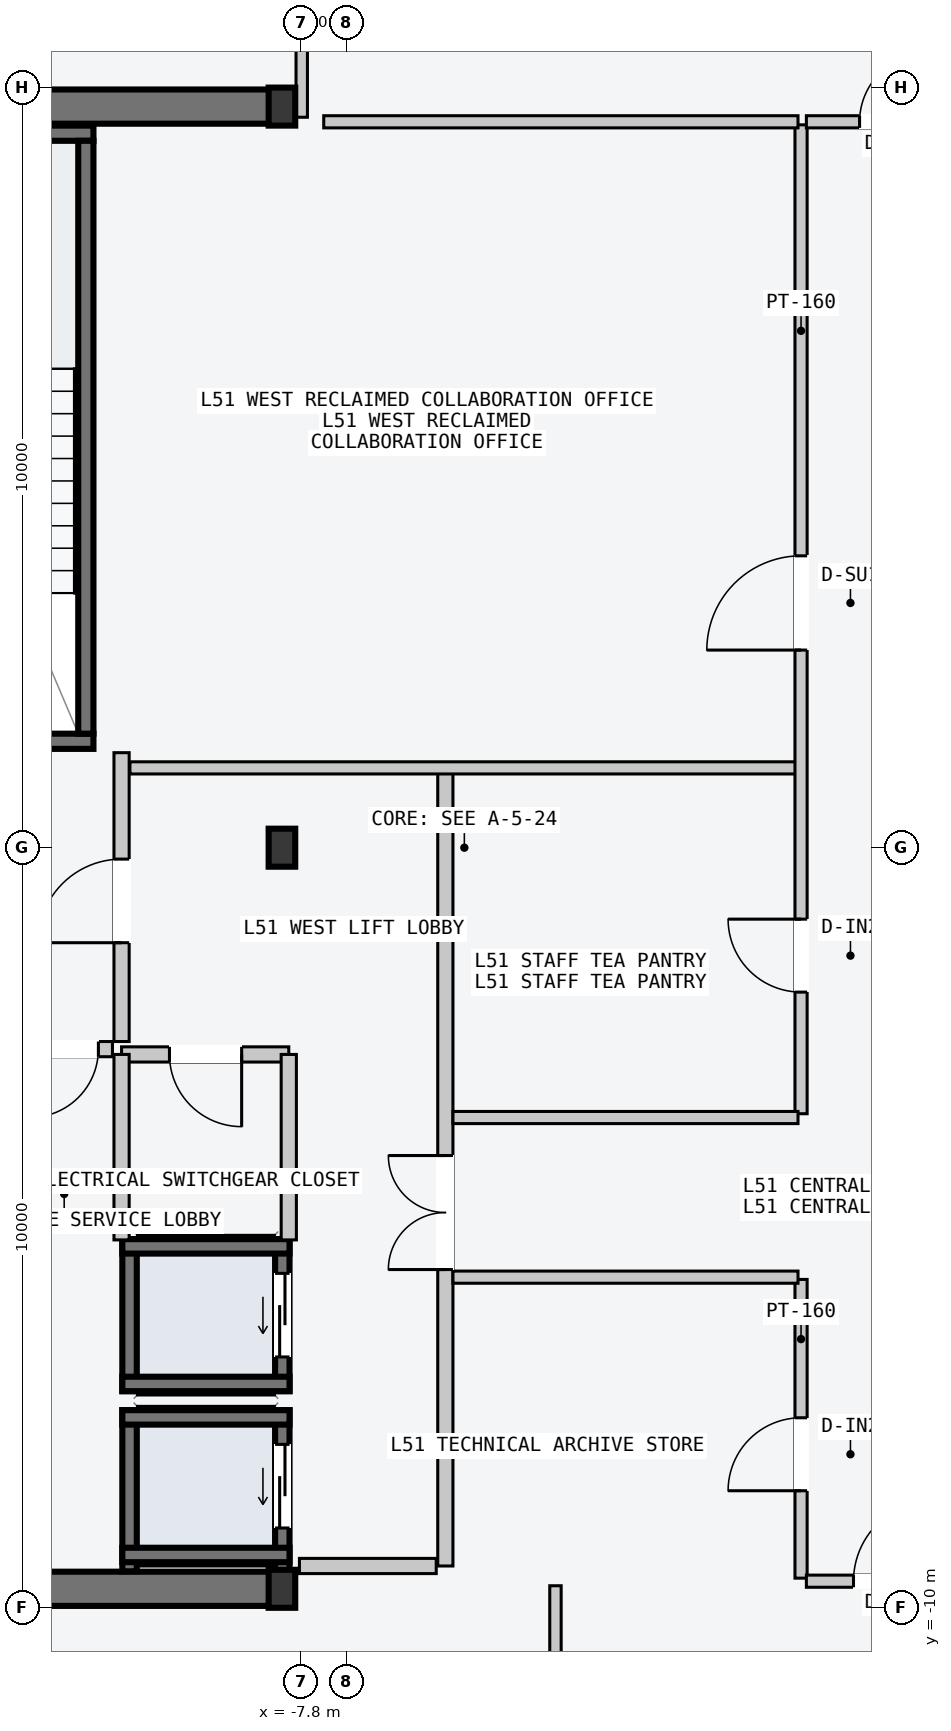
"""IFC4 building model, lengths in metres.
Left out: names, types, materials, properties, quantities, classifications, styles, units other than length and angle.
Written with IfcOpenShell. Run it as: python <this file> out.ifc"""

import sys

from ifc_helpers import new_model, si_unit, direction, frame, frame_2d, origin, origin_2d, place, context, subcontext, project, spatial, rectangle, i_section, extrude, element, fill, save


model = new_model("IFC4")
c1 = context("Model", 3, precision=1e-05, world=origin(), true_north=direction((0.0, 1.0)))
c2 = subcontext(c1, "Body", "Model", "MODEL_VIEW")
j1 = project(units=[si_unit("LENGTHUNIT", "METRE"), si_unit("PLANEANGLEUNIT", "RADIAN")], contexts=[c1])
p1 = place(None, origin())
s1 = spatial("IfcSite", under=j1, at=p1, CompositionType="ELEMENT")
p2 = place(p1, origin())
s2 = spatial("IfcBuilding", under=s1, at=p2, CompositionType="ELEMENT")
p3 = place(p2, frame((0.0, 0.0, 194.7)))
s3 = spatial("IfcBuildingStorey", under=s2, at=p3, CompositionType="ELEMENT", Elevation=194.7)
for number, where, z_axis, x_axis in (
    (1, (-14.53, -9.75, -0.2), (0.0, 0.0, 1.0), (1.0, 0.0, 0.0)),
    (2, (-14.53, 9.75, -0.2), (0.0, 0.0, 1.0), (1.0, 0.0, 0.0)),
):
    element("IfcWall", number, at=place(p3, frame(where, z_axis=z_axis, x_axis=x_axis)), inside=s3, PredefinedType="SHEAR", context=c2, shape_type="SweptSolid", body=[
        extrude(rectangle(XDim=6.46, YDim=0.45, at=frame_2d((3.23, 0.0))), origin(), (0.0, 0.0, 1.0), 3.6),
    ])
p4 = place(p3, frame((-14.25, 1.4, -0.2), z_axis=(0.0, 0.0, 1.0), x_axis=(1.0, 0.0, 0.0)))
e3 = element("IfcWall", 3, at=p4, inside=s3, PredefinedType="SOLIDWALL", context=c2, shape_type="SweptSolid", body=[
    extrude(rectangle(XDim=3.72, YDim=0.2, at=frame_2d((1.86, 0.0))), origin(), (0.0, 0.0, 1.0), 3.6),
])
p5 = place(p4, frame((1.5, 0.0, 0.2)))
e4 = element("IfcOpeningElement", 4, at=p5, cuts=e3, PredefinedType="OPENING", context=c2, shape_type="SweptSolid", body=[
    extrude(rectangle(XDim=1.12, YDim=2.18, at=frame_2d((0.56, 1.09))), frame((0.0, 0.11, 0.0), z_axis=(0.0, -1.0, 0.0), x_axis=(1.0, 0.0, 0.0)), (0.0, 0.0, 1.0), 0.22),
])
p6 = place(p3, frame((-14.25, 9.4, -0.2), z_axis=(0.0, 0.0, 1.0), x_axis=(1.0, 0.0, 0.0)))
e5 = element("IfcWall", 5, at=p6, inside=s3, PredefinedType="SOLIDWALL", context=c2, shape_type="SweptSolid", body=[
    extrude(rectangle(XDim=3.72, YDim=0.2, at=frame_2d((1.86, 0.0))), origin(), (0.0, 0.0, 1.0), 3.6),
])
p7 = place(p3, frame((-10.63, 1.5, -0.2), z_axis=(0.0, 0.0, 1.0), x_axis=(0.0, 1.0, 0.0)))
e6 = element("IfcWall", 6, at=p7, inside=s3, PredefinedType="SOLIDWALL", context=c2, shape_type="SweptSolid", body=[
    extrude(rectangle(XDim=7.8, YDim=0.2, at=frame_2d((3.9, 0.0))), origin(), (0.0, 0.0, 1.0), 3.6),
])
for number, where, z_axis, x_axis in (
    (7, (-8.05, -9.75, 0.0), (0.0, 0.0, 1.0), (1.0, 0.0, 0.0)),
    (8, (-8.05, 0.0, 0.0), (0.0, 0.0, 1.0), (1.0, 0.0, 0.0)),
    (9, (-8.05, 9.75, 0.0), (0.0, 0.0, 1.0), (1.0, 0.0, 0.0)),
):
    element("IfcColumn", number, at=place(p3, frame(where, z_axis=z_axis, x_axis=x_axis)), inside=s3, PredefinedType="COLUMN", context=c2, shape_type="SweptSolid", body=[
        extrude(i_section(OverallWidth=0.35, OverallDepth=0.5, WebThickness=0.02, FlangeThickness=0.032, at=origin_2d()), origin(), (0.0, 0.0, 1.0), 3.6),
    ])
p8 = place(p3, frame((-8.045, -9.52, -0.2), z_axis=(0.0, 0.0, 1.0), x_axis=(0.0, 1.0, 0.0)))
e10 = element("IfcWall", 10, at=p8, inside=s3, PredefinedType="SOLIDWALL", context=c2, shape_type="SweptSolid", body=[
    extrude(rectangle(XDim=2.12, YDim=0.19, at=frame_2d((1.06, 0.0))), origin(), (0.0, 0.0, 1.0), 3.6),
])
p9 = place(p8, frame((0.57, 0.0, 0.2)))
e11 = element("IfcOpeningElement", 11, at=p9, cuts=e10, PredefinedType="OPENING", context=c2, shape_type="SweptSolid", body=[
    extrude(rectangle(XDim=1.1, YDim=2.2, at=frame_2d((0.55, 1.1))), frame((0.0, 0.105, 0.0), z_axis=(0.0, -1.0, 0.0), x_axis=(1.0, 0.0, 0.0)), (0.0, 0.0, 1.0), 0.21),
])
p10 = place(p3, frame((-10.055, -9.52, -0.2), z_axis=(0.0, 0.0, 1.0), x_axis=(0.0, 1.0, 0.0)))
e12 = element("IfcWall", 12, at=p10, inside=s3, PredefinedType="SOLIDWALL", context=c2, shape_type="SweptSolid", body=[
    extrude(rectangle(XDim=2.12, YDim=0.19, at=frame_2d((1.06, 0.0))), origin(), (0.0, 0.0, 1.0), 3.6),
])
for number, where, z_axis, x_axis in (
    (13, (-10.15, -7.495, -0.2), (0.0, 0.0, 1.0), (1.0, 0.0, 0.0)),
    (14, (-10.15, -9.305, -0.2), (0.0, 0.0, 1.0), (1.0, 0.0, 0.0)),
):
    element("IfcWall", number, at=place(p3, frame(where, z_axis=z_axis, x_axis=x_axis)), inside=s3, PredefinedType="SOLIDWALL", context=c2, shape_type="SweptSolid", body=[
        extrude(rectangle(XDim=2.2, YDim=0.19, at=frame_2d((1.1, 0.0))), origin(), (0.0, 0.0, 1.0), 3.6),
    ])
p11 = place(p3, frame((-8.045, -7.15, -0.2), z_axis=(0.0, 0.0, 1.0), x_axis=(0.0, 1.0, 0.0)))
e15 = element("IfcWall", 15, at=p11, inside=s3, PredefinedType="SOLIDWALL", context=c2, shape_type="SweptSolid", body=[
    extrude(rectangle(XDim=2.0, YDim=0.19, at=frame_2d((1.0, 0.0))), origin(), (0.0, 0.0, 1.0), 3.6),
])
p12 = place(p11, frame((0.45, 0.0, 0.2)))
e16 = element("IfcOpeningElement", 16, at=p12, cuts=e15, PredefinedType="OPENING", context=c2, shape_type="SweptSolid", body=[
    extrude(rectangle(XDim=1.1, YDim=2.2, at=frame_2d((0.55, 1.1))), frame((0.0, 0.105, 0.0), z_axis=(0.0, -1.0, 0.0), x_axis=(1.0, 0.0, 0.0)), (0.0, 0.0, 1.0), 0.21),
])
p13 = place(p3, frame((-10.055, -7.15, -0.2), z_axis=(0.0, 0.0, 1.0), x_axis=(0.0, 1.0, 0.0)))
e17 = element("IfcWall", 17, at=p13, inside=s3, PredefinedType="SOLIDWALL", context=c2, shape_type="SweptSolid", body=[
    extrude(rectangle(XDim=2.0, YDim=0.19, at=frame_2d((1.0, 0.0))), origin(), (0.0, 0.0, 1.0), 3.6),
])
for number, where, z_axis, x_axis in (
    (18, (-10.15, -5.245, -0.2), (0.0, 0.0, 1.0), (1.0, 0.0, 0.0)),
    (19, (-10.15, -7.055, -0.2), (0.0, 0.0, 1.0), (1.0, 0.0, 0.0)),
):
    element("IfcWall", number, at=place(p3, frame(where, z_axis=z_axis, x_axis=x_axis)), inside=s3, PredefinedType="SOLIDWALL", context=c2, shape_type="SweptSolid", body=[
        extrude(rectangle(XDim=2.2, YDim=0.19, at=frame_2d((1.1, 0.0))), origin(), (0.0, 0.0, 1.0), 3.6),
    ])
p14 = place(p3, frame((-5.9, -9.45, 0.0), z_axis=(0.0, 0.0, 1.0), x_axis=(0.0, 1.0, 0.0)))
e20 = element("IfcWall", 20, at=p14, inside=s3, PredefinedType="PARTITIONING", context=c2, shape_type="SweptSolid", body=[
    extrude(rectangle(XDim=10.5, YDim=0.2, at=frame_2d((5.25, 0.0))), origin(), (0.0, 0.0, 1.0), 3.4),
])
p15 = place(p14, frame((3.9, 0.0, 0.0)))
e21 = element("IfcOpeningElement", 21, at=p15, cuts=e20, PredefinedType="OPENING", context=c2, shape_type="SweptSolid", body=[
    extrude(rectangle(XDim=1.5, YDim=2.2, at=frame_2d((0.75, 1.1))), frame((0.0, 0.11, 0.0), z_axis=(0.0, -1.0, 0.0), x_axis=(1.0, 0.0, 0.0)), (0.0, 0.0, 1.0), 0.22),
])
p16 = place(p3, frame((-6.02, -9.45, 0.0), z_axis=(0.0, 0.0, 1.0), x_axis=(-1.0, 0.0, 0.0)))
e22 = element("IfcWall", 22, at=p16, inside=s3, PredefinedType="PARTITIONING", context=c2, shape_type="SweptSolid", body=[
    extrude(rectangle(XDim=1.8, YDim=0.2, at=frame_2d((0.9, 0.0))), origin(), (0.0, 0.0, 1.0), 3.4),
])
p17 = place(p3, frame((-10.16, -2.55, 0.0), z_axis=(0.0, 0.0, 1.0), x_axis=(0.0, 1.0, 0.0)))
e23 = element("IfcWall", 23, at=p17, inside=s3, PredefinedType="PARTITIONING", context=c2, shape_type="SweptSolid", body=[
    extrude(rectangle(XDim=3.8, YDim=0.2, at=frame_2d((1.9, 0.0))), origin(), (0.0, 0.0, 1.0), 3.4),
])
p18 = place(p17, frame((1.3, 0.0, 0.0)))
e24 = element("IfcOpeningElement", 24, at=p18, cuts=e23, PredefinedType="OPENING", context=c2, shape_type="SweptSolid", body=[
    extrude(rectangle(XDim=1.1, YDim=2.15, at=frame_2d((0.55, 1.075))), frame((0.0, 0.11, 0.0), z_axis=(0.0, -1.0, 0.0), x_axis=(1.0, 0.0, 0.0)), (0.0, 0.0, 1.0), 0.22),
])
p19 = place(p3, frame((-10.28, -2.65, 0.0), z_axis=(0.0, 0.0, 1.0), x_axis=(-1.0, 0.0, 0.0)))
e25 = element("IfcWall", 25, at=p19, inside=s3, PredefinedType="PARTITIONING", context=c2, shape_type="SweptSolid", body=[
    extrude(rectangle(XDim=1.27, YDim=0.2, at=frame_2d((0.635, 0.0))), origin(), (0.0, 0.0, 1.0), 3.4),
])
p20 = place(p19, frame((0.185, 0.0, 0.0)))
e26 = element("IfcOpeningElement", 26, at=p20, cuts=e25, PredefinedType="OPENING", context=c2, shape_type="SweptSolid", body=[
    extrude(rectangle(XDim=0.9, YDim=2.15, at=frame_2d((0.45, 1.075))), frame((0.0, 0.11, 0.0), z_axis=(0.0, -1.0, 0.0), x_axis=(1.0, 0.0, 0.0)), (0.0, 0.0, 1.0), 0.22),
])
p21 = place(p3, frame((-7.96, -2.72, 0.0), z_axis=(0.0, 0.0, 1.0), x_axis=(-1.0, 0.0, 0.0)))
e27 = element("IfcWall", 27, at=p21, inside=s3, PredefinedType="PARTITIONING", context=c2, shape_type="SweptSolid", body=[
    extrude(rectangle(XDim=2.2, YDim=0.2, at=frame_2d((1.1, 0.0))), origin(), (0.0, 0.0, 1.0), 3.4),
])
p22 = place(p21, frame((0.62, 0.0, 0.0)))
e28 = element("IfcOpeningElement", 28, at=p22, cuts=e27, PredefinedType="OPENING", context=c2, shape_type="SweptSolid", body=[
    extrude(rectangle(XDim=0.95, YDim=2.1, at=frame_2d((0.475, 1.05))), frame((0.0, 0.11, 0.0), z_axis=(0.0, -1.0, 0.0), x_axis=(1.0, 0.0, 0.0)), (0.0, 0.0, 1.0), 0.22),
])
for number, where, z_axis, x_axis in (
    (29, (-7.96, -5.16, 0.0), (0.0, 0.0, 1.0), (0.0, 1.0, 0.0)),
    (30, (-10.16, -5.16, 0.0), (0.0, 0.0, 1.0), (0.0, 1.0, 0.0)),
):
    element("IfcWall", number, at=place(p3, frame(where, z_axis=z_axis, x_axis=x_axis)), inside=s3, PredefinedType="PARTITIONING", context=c2, shape_type="SweptSolid", body=[
        extrude(rectangle(XDim=2.44, YDim=0.2, at=frame_2d((1.22, 0.0))), origin(), (0.0, 0.0, 1.0), 3.4),
    ])
p23 = place(p3, frame((-10.05, 1.05, 0.0), z_axis=(0.0, 0.0, 1.0), x_axis=(1.0, 0.0, 0.0)))
e31 = element("IfcWall", 31, at=p23, inside=s3, PredefinedType="PARTITIONING", context=c2, shape_type="SweptSolid", body=[
    extrude(rectangle(XDim=8.79, YDim=0.16, at=frame_2d((4.395, 0.0))), origin(), (0.0, 0.0, 1.0), 3.4),
])
p24 = place(p3, frame((-1.22, -3.5, 0.0), z_axis=(0.0, 0.0, 1.0), x_axis=(0.0, 1.0, 0.0)))
e32 = element("IfcWall", 32, at=p24, inside=s3, PredefinedType="PARTITIONING", context=c2, shape_type="SweptSolid", body=[
    extrude(rectangle(XDim=13.01, YDim=0.16, at=frame_2d((6.505, 0.0))), origin(), (0.0, 0.0, 1.0), 3.4),
])
p25 = place(p24, frame((6.1, 0.0, 0.0)))
e33 = element("IfcOpeningElement", 33, at=p25, cuts=e32, PredefinedType="OPENING", context=c2, shape_type="SweptSolid", body=[
    extrude(rectangle(XDim=1.24, YDim=2.24, at=frame_2d((0.62, 1.12))), frame((0.0, 0.09, 0.0), z_axis=(0.0, -1.0, 0.0), x_axis=(1.0, 0.0, 0.0)), (0.0, 0.0, 1.0), 0.18),
])
p26 = place(p24, frame((1.6, 0.0, 0.0)))
e34 = element("IfcOpeningElement", 34, at=p26, cuts=e32, PredefinedType="OPENING", context=c2, shape_type="SweptSolid", body=[
    extrude(rectangle(XDim=0.96, YDim=2.18, at=frame_2d((0.48, 1.09))), frame((0.0, 0.09, 0.0), z_axis=(0.0, -1.0, 0.0), x_axis=(1.0, 0.0, 0.0)), (0.0, 0.0, 1.0), 0.18),
])
p27 = place(p3, frame((-7.5, 9.55, 0.0), z_axis=(0.0, 0.0, 1.0), x_axis=(1.0, 0.0, 0.0)))
e35 = element("IfcWall", 35, at=p27, inside=s3, PredefinedType="PARTITIONING", context=c2, shape_type="SweptSolid", body=[
    extrude(rectangle(XDim=6.24, YDim=0.16, at=frame_2d((3.12, 0.0))), origin(), (0.0, 0.0, 1.0), 3.4),
])
p28 = place(p3, frame((-5.8, -3.55, 0.0), z_axis=(0.0, 0.0, 1.0), x_axis=(1.0, 0.0, 0.0)))
e36 = element("IfcWall", 36, at=p28, inside=s3, PredefinedType="PARTITIONING", context=c2, shape_type="SweptSolid", body=[
    extrude(rectangle(XDim=4.54, YDim=0.16, at=frame_2d((2.27, 0.0))), origin(), (0.0, 0.0, 1.0), 3.4),
])
p29 = place(p3, frame((-1.22, -9.61, 0.0), z_axis=(0.0, 0.0, 1.0), x_axis=(0.0, 1.0, 0.0)))
e37 = element("IfcWall", 37, at=p29, inside=s3, PredefinedType="PARTITIONING", context=c2, shape_type="SweptSolid", body=[
    extrude(rectangle(XDim=3.93, YDim=0.16, at=frame_2d((1.965, 0.0))), origin(), (0.0, 0.0, 1.0), 3.4),
])
p30 = place(p29, frame((1.15, 0.0, 0.0)))
e38 = element("IfcOpeningElement", 38, at=p30, cuts=e37, PredefinedType="OPENING", context=c2, shape_type="SweptSolid", body=[
    extrude(rectangle(XDim=0.96, YDim=2.18, at=frame_2d((0.48, 1.09))), frame((0.0, 0.09, 0.0), z_axis=(0.0, -1.0, 0.0), x_axis=(1.0, 0.0, 0.0)), (0.0, 0.0, 1.0), 0.18),
])
p31 = place(p3, frame((-5.8, -5.65, 0.0), z_axis=(0.0, 0.0, 1.0), x_axis=(1.0, 0.0, 0.0)))
e39 = element("IfcWall", 39, at=p31, inside=s3, PredefinedType="PARTITIONING", context=c2, shape_type="SweptSolid", body=[
    extrude(rectangle(XDim=4.54, YDim=0.16, at=frame_2d((2.27, 0.0))), origin(), (0.0, 0.0, 1.0), 3.4),
])
p32 = place(p3, frame((-7.79, 9.61, 0.0), z_axis=(0.0, 0.0, 1.0), x_axis=(0.0, 1.0, 0.0)))
e40 = element("IfcWall", 40, at=p32, inside=s3, PredefinedType="PARTITIONING", context=c2, shape_type="SweptSolid", body=[
    extrude(rectangle(XDim=8.95, YDim=0.15, at=frame_2d((4.475, 0.0))), origin(), (0.0, 0.0, 1.0), 3.4),
])
p33 = place(p32, frame((1.34, 0.0, 0.0)))
e41 = element("IfcOpeningElement", 41, at=p33, cuts=e40, PredefinedType="OPENING", context=c2, shape_type="SweptSolid", body=[
    extrude(rectangle(XDim=0.96, YDim=2.18, at=frame_2d((0.48, 1.09))), frame((0.0, 0.085, 0.0), z_axis=(0.0, -1.0, 0.0), x_axis=(1.0, 0.0, 0.0)), (0.0, 0.0, 1.0), 0.17),
])
p34 = place(p3, frame((-1.15, 9.55, 0.0), z_axis=(0.0, 0.0, 1.0), x_axis=(1.0, 0.0, 0.0)))
e42 = element("IfcWall", 42, at=p34, inside=s3, PredefinedType="PARTITIONING", context=c2, shape_type="SweptSolid", body=[
    extrude(rectangle(XDim=2.3, YDim=0.16, at=frame_2d((1.15, 0.0))), origin(), (0.0, 0.0, 1.0), 3.4),
])
p35 = place(p34, frame((0.7, 0.0, 0.0)))
e43 = element("IfcOpeningElement", 43, at=p35, cuts=e42, PredefinedType="OPENING", context=c2, shape_type="SweptSolid", body=[
    extrude(rectangle(XDim=0.9, YDim=2.15, at=frame_2d((0.45, 1.075))), frame((0.0, 0.09, 0.0), z_axis=(0.0, -1.0, 0.0), x_axis=(1.0, 0.0, 0.0)), (0.0, 0.0, 1.0), 0.18),
])
p36 = place(p3, frame((-4.451, -18.56, 0.0), z_axis=(0.0, 0.0, 1.0), x_axis=(0.0, 1.0, 0.0)))
e44 = element("IfcWall", 44, at=p36, inside=s3, PredefinedType="PARTITIONING", context=c2, shape_type="SweptSolid", body=[
    extrude(rectangle(XDim=8.85, YDim=0.15, at=frame_2d((4.425, 0.0))), origin(), (0.0, 0.0, 1.0), 3.4),
])
p37 = place(p36, frame((1.05, 0.0, 0.0)))
e45 = element("IfcOpeningElement", 45, at=p37, cuts=e44, PredefinedType="OPENING", context=c2, shape_type="SweptSolid", body=[
    extrude(rectangle(XDim=0.96, YDim=2.18, at=frame_2d((0.48, 1.09))), frame((0.0, 0.085, 0.0), z_axis=(0.0, -1.0, 0.0), x_axis=(1.0, 0.0, 0.0)), (0.0, 0.0, 1.0), 0.17),
])
p38 = place(p3, frame((-1.15, -9.65, 0.0), z_axis=(0.0, 0.0, 1.0), x_axis=(1.0, 0.0, 0.0)))
e46 = element("IfcWall", 46, at=p38, inside=s3, PredefinedType="PARTITIONING", context=c2, shape_type="SweptSolid", body=[
    extrude(rectangle(XDim=2.3, YDim=0.16, at=frame_2d((1.15, 0.0))), origin(), (0.0, 0.0, 1.0), 2.75),
])
p39 = place(p38, frame((0.62, 0.0, 0.0)))
e47 = element("IfcOpeningElement", 47, at=p39, cuts=e46, PredefinedType="OPENING", context=c2, shape_type="SweptSolid", body=[
    extrude(rectangle(XDim=1.06, YDim=2.2, at=frame_2d((0.53, 1.1))), frame((0.0, 0.09, 0.0), z_axis=(0.0, -1.0, 0.0), x_axis=(1.0, 0.0, 0.0)), (0.0, 0.0, 1.0), 0.18),
])
p40 = place(p9, origin())
e48 = element("IfcDoor", 48, at=p40, inside=s3, OperationType="SLIDING_TO_LEFT", PredefinedType="DOOR", context=c2, shape_type="SweptSolid", body=[
    extrude(rectangle(XDim=1.1, YDim=2.2, at=frame_2d((0.55, 1.1))), frame((0.0, 0.025, 0.0), z_axis=(0.0, -1.0, 0.0), x_axis=(1.0, 0.0, 0.0)), (0.0, 0.0, 1.0), 0.05),
])
fill(e11, e48)
p41 = place(p12, origin())
e49 = element("IfcDoor", 49, at=p41, inside=s3, OperationType="SLIDING_TO_LEFT", PredefinedType="DOOR", context=c2, shape_type="SweptSolid", body=[
    extrude(rectangle(XDim=1.1, YDim=2.2, at=frame_2d((0.55, 1.1))), frame((0.0, 0.025, 0.0), z_axis=(0.0, -1.0, 0.0), x_axis=(1.0, 0.0, 0.0)), (0.0, 0.0, 1.0), 0.05),
])
fill(e16, e49)
p42 = place(p15, origin())
e50 = element("IfcDoor", 50, at=p42, inside=s3, OperationType="DOUBLE_DOOR_SINGLE_SWING", PredefinedType="DOOR", context=c2, shape_type="SweptSolid", body=[
    extrude(rectangle(XDim=1.5, YDim=2.2, at=frame_2d((0.75, 1.1))), frame((0.0, 0.025, 0.0), z_axis=(0.0, -1.0, 0.0), x_axis=(1.0, 0.0, 0.0)), (0.0, 0.0, 1.0), 0.05),
])
fill(e21, e50)
p43 = place(p18, origin())
e51 = element("IfcDoor", 51, at=p43, inside=s3, OperationType="SINGLE_SWING_LEFT", PredefinedType="DOOR", context=c2, shape_type="SweptSolid", body=[
    extrude(rectangle(XDim=1.1, YDim=2.15, at=frame_2d((0.55, 1.075))), frame((0.0, 0.025, 0.0), z_axis=(0.0, -1.0, 0.0), x_axis=(1.0, 0.0, 0.0)), (0.0, 0.0, 1.0), 0.05),
])
fill(e24, e51)
p44 = place(p20, origin())
e52 = element("IfcDoor", 52, at=p44, inside=s3, OperationType="SINGLE_SWING_RIGHT", PredefinedType="DOOR", context=c2, shape_type="SweptSolid", body=[
    extrude(rectangle(XDim=0.9, YDim=2.15, at=frame_2d((0.45, 1.075))), frame((0.0, 0.025, 0.0), z_axis=(0.0, -1.0, 0.0), x_axis=(1.0, 0.0, 0.0)), (0.0, 0.0, 1.0), 0.05),
])
fill(e26, e52)
p45 = place(p22, origin())
e53 = element("IfcDoor", 53, at=p45, inside=s3, OperationType="SINGLE_SWING_LEFT", PredefinedType="DOOR", context=c2, shape_type="SweptSolid", body=[
    extrude(rectangle(XDim=0.95, YDim=2.1, at=frame_2d((0.475, 1.05))), frame((0.0, 0.025, 0.0), z_axis=(0.0, -1.0, 0.0), x_axis=(1.0, 0.0, 0.0)), (0.0, 0.0, 1.0), 0.05),
])
fill(e28, e53)
p46 = place(p25, origin())
e54 = element("IfcDoor", 54, at=p46, inside=s3, OperationType="SINGLE_SWING_LEFT", PredefinedType="DOOR", context=c2, shape_type="SweptSolid", body=[
    extrude(rectangle(XDim=1.24, YDim=2.24, at=frame_2d((0.62, 1.12))), frame((0.0, 0.025, 0.0), z_axis=(0.0, -1.0, 0.0), x_axis=(1.0, 0.0, 0.0)), (0.0, 0.0, 1.0), 0.05),
])
fill(e33, e54)
p47 = place(p26, origin())
e55 = element("IfcDoor", 55, at=p47, inside=s3, OperationType="SINGLE_SWING_RIGHT", PredefinedType="DOOR", context=c2, shape_type="SweptSolid", body=[
    extrude(rectangle(XDim=0.96, YDim=2.18, at=frame_2d((0.48, 1.09))), frame((0.0, 0.025, 0.0), z_axis=(0.0, -1.0, 0.0), x_axis=(1.0, 0.0, 0.0)), (0.0, 0.0, 1.0), 0.05),
])
fill(e34, e55)
p48 = place(p30, origin())
e56 = element("IfcDoor", 56, at=p48, inside=s3, OperationType="SINGLE_SWING_LEFT", PredefinedType="DOOR", context=c2, shape_type="SweptSolid", body=[
    extrude(rectangle(XDim=0.96, YDim=2.18, at=frame_2d((0.48, 1.09))), frame((0.0, 0.025, 0.0), z_axis=(0.0, -1.0, 0.0), x_axis=(1.0, 0.0, 0.0)), (0.0, 0.0, 1.0), 0.05),
])
fill(e38, e56)
p49 = place(p35, origin())
e57 = element("IfcDoor", 57, at=p49, inside=s3, OperationType="SINGLE_SWING_RIGHT", PredefinedType="DOOR", context=c2, shape_type="SweptSolid", body=[
    extrude(rectangle(XDim=0.9, YDim=2.15, at=frame_2d((0.45, 1.075))), frame((0.0, 0.025, 0.0), z_axis=(0.0, -1.0, 0.0), x_axis=(1.0, 0.0, 0.0)), (0.0, 0.0, 1.0), 0.05),
])
fill(e43, e57)
p50 = place(p39, origin())
e58 = element("IfcDoor", 58, at=p50, inside=s3, OperationType="SINGLE_SWING_RIGHT", PredefinedType="DOOR", context=c2, shape_type="SweptSolid", body=[
    extrude(rectangle(XDim=1.06, YDim=2.2, at=frame_2d((0.53, 1.1))), frame((0.0, 0.025, 0.0), z_axis=(0.0, -1.0, 0.0), x_axis=(1.0, 0.0, 0.0)), (0.0, 0.0, 1.0), 0.05),
])
fill(e47, e58)
save(model, sys.argv[1])
